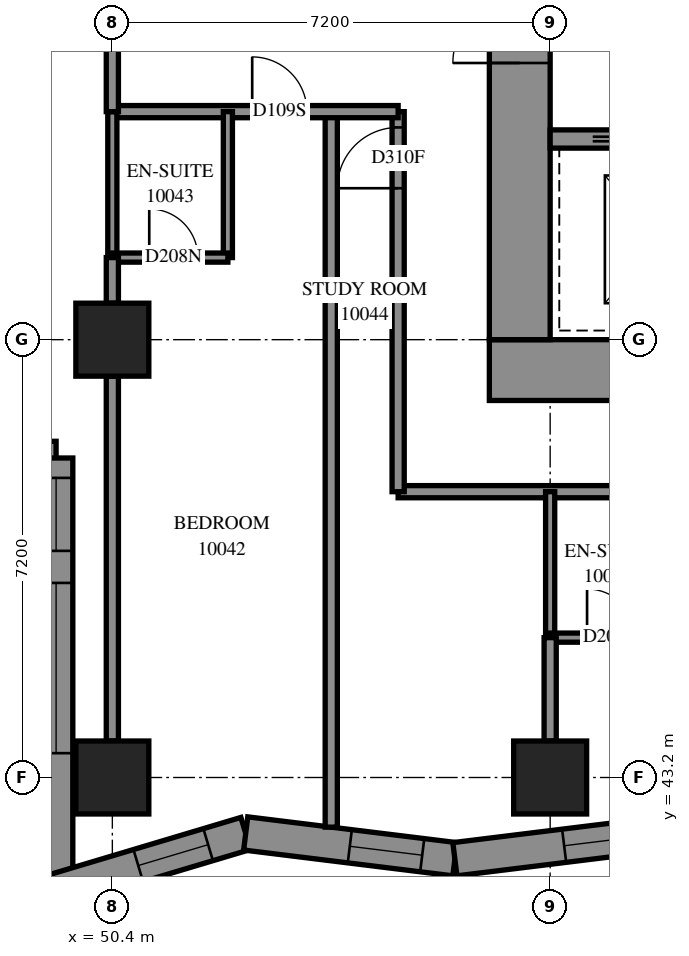
"""IFC4 building model, lengths in metres.
Left out: names, types, materials, properties, quantities, classifications, styles, units other than length and angle.
Written with IfcOpenShell. Run it as: python <this file> out.ifc"""

import sys

from ifc_helpers import new_model, si_unit, direction, frame, frame_2d, origin, origin_2d, place, context, subcontext, project, spatial, polyline, rectangle, outline, extrude, element, fill, save


model = new_model("IFC4")
c1 = context("Model", 3, precision=1e-05, world=origin(), true_north=direction((0.0, 1.0)))
c2 = subcontext(c1, "Body", "Model", "MODEL_VIEW")
j1 = project(units=[si_unit("LENGTHUNIT", "METRE"), si_unit("PLANEANGLEUNIT", "RADIAN")], contexts=[c1])
p1 = place(None, origin())
s1 = spatial("IfcSite", under=j1, at=p1, CompositionType="ELEMENT")
p2 = place(p1, origin())
s2 = spatial("IfcBuilding", under=s1, at=p2, CompositionType="ELEMENT")
p3 = place(p2, frame((0.0, 0.0, 40.6)))
s3 = spatial("IfcBuildingStorey", under=s2, at=p3, CompositionType="ELEMENT", Elevation=40.6)
for number, where, z_axis, x_axis in (
    (1, (50.4, 43.2, 0.0), (0.0, 0.0, 1.0), (1.0, 0.0, 0.0)),
    (2, (50.4, 50.4, 0.0), (0.0, 0.0, 1.0), (1.0, 0.0, 0.0)),
    (3, (57.6, 43.2, 0.0), (0.0, 0.0, 1.0), (1.0, 0.0, 0.0)),
):
    element("IfcColumn", number, at=place(p3, frame(where, z_axis=z_axis, x_axis=x_axis)), inside=s3, PredefinedType="COLUMN", context=c2, shape_type="SweptSolid", body=[
        extrude(rectangle(XDim=1.2, YDim=1.2, at=origin_2d()), origin(), (0.0, 0.0, 1.0), 3.1),
    ])
p4 = place(p3, frame((56.6, 49.9, -0.3), z_axis=(0.0, 0.0, 1.0), x_axis=(1.0, 0.0, 0.0)))
e4 = element("IfcWall", 4, at=p4, inside=s3, PredefinedType="SHEAR", context=c2, shape_type="SweptSolid", body=[
    extrude(rectangle(XDim=16.4, YDim=1.0, at=frame_2d((8.2, 0.0))), origin(), (0.0, 0.0, 1.0), 2.7),
])
p5 = place(p3, frame((57.1, 50.4, -0.3), z_axis=(0.0, 0.0, 1.0), x_axis=(0.0, 1.0, 0.0)))
e5 = element("IfcWall", 5, at=p5, inside=s3, PredefinedType="SHEAR", context=c2, shape_type="SweptSolid", body=[
    extrude(rectangle(XDim=14.4, YDim=1.0, at=frame_2d((7.2, 0.0))), origin(), (0.0, 0.0, 1.0), 2.7),
])
p6 = place(p5, frame((4.55, 0.0, 0.3)))
e6 = element("IfcOpeningElement", 6, at=p6, cuts=e5, PredefinedType="OPENING", context=c2, shape_type="SweptSolid", body=[
    extrude(rectangle(XDim=1.1, YDim=2.1, at=frame_2d((0.55, 1.05))), frame((0.0, 0.51, 0.0), z_axis=(0.0, -1.0, 0.0), x_axis=(1.0, 0.0, 0.0)), (0.0, 0.0, 1.0), 1.02),
])
p7 = place(p5, frame((11.35, 0.0, 0.3)))
e7 = element("IfcOpeningElement", 7, at=p7, cuts=e5, PredefinedType="OPENING", context=c2, shape_type="SweptSolid", body=[
    extrude(rectangle(XDim=1.1, YDim=2.1, at=frame_2d((0.55, 1.05))), frame((0.0, 0.51, 0.0), z_axis=(0.0, -1.0, 0.0), x_axis=(1.0, 0.0, 0.0)), (0.0, 0.0, 1.0), 1.02),
])
p8 = place(p3, frame((57.6, 53.7, 0.0), z_axis=(0.0, 0.0, 1.0), x_axis=(1.0, 0.0, 0.0)))
e8 = element("IfcWall", 8, at=p8, inside=s3, PredefinedType="SOLIDWALL", context=c2, shape_type="SweptSolid", body=[
    extrude(rectangle(XDim=14.4, YDim=0.3, at=frame_2d((7.2, 0.0))), origin(), (0.0, 0.0, 1.0), 3.1),
])
p9 = place(p8, frame((1.25, 0.0, 0.0)))
e9 = element("IfcOpeningElement", 9, at=p9, cuts=e8, PredefinedType="OPENING", context=c2, shape_type="SweptSolid", body=[
    extrude(rectangle(XDim=1.1, YDim=2.1, at=frame_2d((0.55, 1.05))), frame((0.0, 0.16, 0.0), z_axis=(0.0, -1.0, 0.0), x_axis=(1.0, 0.0, 0.0)), (0.0, 0.0, 1.0), 0.32),
])
p10 = place(p8, frame((4.85, 0.0, 0.0)))
e10 = element("IfcOpeningElement", 10, at=p10, cuts=e8, PredefinedType="OPENING", context=c2, shape_type="SweptSolid", body=[
    extrude(rectangle(XDim=1.1, YDim=2.1, at=frame_2d((0.55, 1.05))), frame((0.0, 0.16, 0.0), z_axis=(0.0, -1.0, 0.0), x_axis=(1.0, 0.0, 0.0)), (0.0, 0.0, 1.0), 0.32),
])
p11 = place(p8, frame((8.45, 0.0, 0.0)))
e11 = element("IfcOpeningElement", 11, at=p11, cuts=e8, PredefinedType="OPENING", context=c2, shape_type="SweptSolid", body=[
    extrude(rectangle(XDim=1.1, YDim=2.1, at=frame_2d((0.55, 1.05))), frame((0.0, 0.16, 0.0), z_axis=(0.0, -1.0, 0.0), x_axis=(1.0, 0.0, 0.0)), (0.0, 0.0, 1.0), 0.32),
])
p12 = place(p8, frame((12.05, 0.0, 0.0)))
e12 = element("IfcOpeningElement", 12, at=p12, cuts=e8, PredefinedType="OPENING", context=c2, shape_type="SweptSolid", body=[
    extrude(rectangle(XDim=1.1, YDim=2.1, at=frame_2d((0.55, 1.05))), frame((0.0, 0.16, 0.0), z_axis=(0.0, -1.0, 0.0), x_axis=(1.0, 0.0, 0.0)), (0.0, 0.0, 1.0), 0.32),
])
p13 = place(p3, frame((35.075, 48.454, 0.0), z_axis=(0.0, 0.0, 1.0), x_axis=(1.0, 0.0, 0.0)))
e13 = element("IfcWall", 13, at=p13, inside=s3, PredefinedType="SOLIDWALL", context=c2, shape_type="SweptSolid", body=[
    extrude(outline(polyline([(-0.275, -0.275), (14.125, -0.275), (14.675, 0.275), (0.275, 0.275), (-0.275, -0.275)])), origin(), (0.0, 0.0, 1.0), 3.1),
])
p14 = place(p13, frame((1.325, 0.0, 0.5)))
e14 = element("IfcOpeningElement", 14, at=p14, cuts=e13, PredefinedType="OPENING", context=c2, shape_type="SweptSolid", body=[
    extrude(rectangle(XDim=2.8, YDim=2.45, at=frame_2d((1.4, 1.225))), frame((0.0, 0.285, 0.0), z_axis=(0.0, -1.0, 0.0), x_axis=(1.0, 0.0, 0.0)), (0.0, 0.0, 1.0), 0.57),
])
p15 = place(p13, frame((4.925, 0.0, 0.5)))
e15 = element("IfcOpeningElement", 15, at=p15, cuts=e13, PredefinedType="OPENING", context=c2, shape_type="SweptSolid", body=[
    extrude(rectangle(XDim=2.8, YDim=2.45, at=frame_2d((1.4, 1.225))), frame((0.0, 0.285, 0.0), z_axis=(0.0, -1.0, 0.0), x_axis=(1.0, 0.0, 0.0)), (0.0, 0.0, 1.0), 0.57),
])
p16 = place(p13, frame((8.275, 0.0, 0.5)))
e16 = element("IfcOpeningElement", 16, at=p16, cuts=e13, PredefinedType="OPENING", context=c2, shape_type="SweptSolid", body=[
    extrude(rectangle(XDim=2.8, YDim=2.45, at=frame_2d((1.4, 1.225))), frame((0.0, 0.285, 0.0), z_axis=(0.0, -1.0, 0.0), x_axis=(1.0, 0.0, 0.0)), (0.0, 0.0, 1.0), 0.57),
])
p17 = place(p13, frame((12.363, 0.0, 0.5)))
e17 = element("IfcOpeningElement", 17, at=p17, cuts=e13, PredefinedType="OPENING", context=c2, shape_type="SweptSolid", body=[
    extrude(rectangle(XDim=1.2, YDim=2.45, at=frame_2d((0.6, 1.225))), frame((0.0, 0.285, 0.0), z_axis=(0.0, -1.0, 0.0), x_axis=(1.0, 0.0, 0.0)), (0.0, 0.0, 1.0), 0.57),
])
p18 = place(p3, frame((49.475, 48.454, 0.0), z_axis=(0.0, 0.0, 1.0), x_axis=(0.0, -1.0, 0.0)))
e18 = element("IfcWall", 18, at=p18, inside=s3, PredefinedType="SOLIDWALL", context=c2, shape_type="SweptSolid", body=[
    extrude(outline(polyline([(0.275, -0.275), (7.475, -0.275), (6.737, 0.275), (-0.275, 0.275), (0.275, -0.275)])), origin(), (0.0, 0.0, 1.0), 3.1),
])
p19 = place(p18, frame((2.054, 0.0, 0.5)))
e19 = element("IfcOpeningElement", 19, at=p19, cuts=e18, PredefinedType="OPENING", context=c2, shape_type="SweptSolid", body=[
    extrude(rectangle(XDim=2.8, YDim=2.45, at=frame_2d((1.4, 1.225))), frame((0.0, 0.285, 0.0), z_axis=(0.0, -1.0, 0.0), x_axis=(1.0, 0.0, 0.0)), (0.0, 0.0, 1.0), 0.57),
])
p20 = place(p18, frame((0.327, 0.0, 0.5)))
e20 = element("IfcOpeningElement", 20, at=p20, cuts=e18, PredefinedType="OPENING", context=c2, shape_type="SweptSolid", body=[
    extrude(rectangle(XDim=1.2, YDim=2.45, at=frame_2d((0.6, 1.225))), frame((0.0, 0.285, 0.0), z_axis=(0.0, -1.0, 0.0), x_axis=(1.0, 0.0, 0.0)), (0.0, 0.0, 1.0), 0.57),
])
p21 = place(p3, frame((49.475, 41.348, 0.0), z_axis=(0.0, 0.0, 1.0), x_axis=(0.9581327376, 0.2863243914, 0.0)))
e21 = element("IfcWall", 21, at=p21, inside=s3, PredefinedType="SOLIDWALL", context=c2, shape_type="SweptSolid", body=[
    extrude(outline(polyline([(-0.369, -0.275), (3.197, -0.275), (3.312, 0.275), (0.369, 0.275), (-0.369, -0.275)])), origin(), (0.0, 0.0, 1.0), 3.1),
])
p22 = place(p21, frame((1.41, 0.0, 0.5)))
e22 = element("IfcOpeningElement", 22, at=p22, cuts=e21, PredefinedType="OPENING", context=c2, shape_type="SweptSolid", body=[
    extrude(rectangle(XDim=1.2, YDim=2.45, at=frame_2d((0.6, 1.225))), frame((0.0, 0.285, 0.0), z_axis=(0.0, -1.0, 0.0), x_axis=(1.0, 0.0, 0.0)), (0.0, 0.0, 1.0), 0.57),
])
p23 = place(p3, frame((52.593, 42.28, 0.0), z_axis=(0.0, 0.0, 1.0), x_axis=(0.9924934036, -0.1222981756, 0.0)))
e23 = element("IfcWall", 23, at=p23, inside=s3, PredefinedType="SOLIDWALL", context=c2, shape_type="SweptSolid", body=[
    extrude(outline(polyline([(0.058, -0.275), (3.5, -0.275), (3.432, 0.275), (-0.058, 0.275), (0.058, -0.275)])), origin(), (0.0, 0.0, 1.0), 3.1),
])
p24 = place(p23, frame((1.725, 0.0, 0.5)))
e24 = element("IfcOpeningElement", 24, at=p24, cuts=e23, PredefinedType="OPENING", context=c2, shape_type="SweptSolid", body=[
    extrude(rectangle(XDim=1.2, YDim=2.45, at=frame_2d((0.6, 1.225))), frame((0.0, 0.285, 0.0), z_axis=(0.0, -1.0, 0.0), x_axis=(1.0, 0.0, 0.0)), (0.0, 0.0, 1.0), 0.57),
])
p25 = place(p3, frame((56.033, 41.856, 0.0), z_axis=(0.0, 0.0, 1.0), x_axis=(0.9924939881, 0.122293432, 0.0)))
e25 = element("IfcWall", 25, at=p25, inside=s3, PredefinedType="SOLIDWALL", context=c2, shape_type="SweptSolid", body=[
    extrude(outline(polyline([(-0.034, -0.275), (3.409, -0.275), (3.476, 0.275), (0.034, 0.275), (-0.034, -0.275)])), origin(), (0.0, 0.0, 1.0), 3.1),
])
p26 = place(p25, frame((1.81, 0.0, 0.5)))
e26 = element("IfcOpeningElement", 26, at=p26, cuts=e25, PredefinedType="OPENING", context=c2, shape_type="SweptSolid", body=[
    extrude(rectangle(XDim=1.2, YDim=2.45, at=frame_2d((0.6, 1.225))), frame((0.0, 0.285, 0.0), z_axis=(0.0, -1.0, 0.0), x_axis=(1.0, 0.0, 0.0)), (0.0, 0.0, 1.0), 0.57),
])
p27 = place(p3, frame((55.1, 47.9, 0.0), z_axis=(0.0, 0.0, 1.0), x_axis=(1.0, 0.0, 0.0)))
e27 = element("IfcWall", 27, at=p27, inside=s3, PredefinedType="PARTITIONING", context=c2, shape_type="SweptSolid", body=[
    extrude(rectangle(XDim=19.204, YDim=0.2, at=frame_2d((9.602, 0.0))), origin(), (0.0, 0.0, 1.0), 3.1),
])
p28 = place(p27, frame((6.399, 0.0, 0.0)))
e28 = element("IfcOpeningElement", 28, at=p28, cuts=e27, PredefinedType="OPENING", context=c2, shape_type="SweptSolid", body=[
    extrude(rectangle(XDim=0.9, YDim=2.1, at=frame_2d((0.45, 1.05))), frame((0.0, 0.11, 0.0), z_axis=(0.0, -1.0, 0.0), x_axis=(1.0, 0.0, 0.0)), (0.0, 0.0, 1.0), 0.22),
])
p29 = place(p27, frame((13.599, 0.0, 0.0)))
e29 = element("IfcOpeningElement", 29, at=p29, cuts=e27, PredefinedType="OPENING", context=c2, shape_type="SweptSolid", body=[
    extrude(rectangle(XDim=0.9, YDim=2.1, at=frame_2d((0.45, 1.05))), frame((0.0, 0.11, 0.0), z_axis=(0.0, -1.0, 0.0), x_axis=(1.0, 0.0, 0.0)), (0.0, 0.0, 1.0), 0.22),
])
p30 = place(p3, frame((54.0, 42.384, 0.0), z_axis=(0.0, 0.0, 1.0), x_axis=(0.0, 1.0, 0.0)))
e30 = element("IfcWall", 30, at=p30, inside=s3, PredefinedType="PARTITIONING", context=c2, shape_type="SweptSolid", body=[
    extrude(rectangle(XDim=11.766, YDim=0.2, at=frame_2d((5.883, 0.0))), origin(), (0.0, 0.0, 1.0), 3.1),
])
p31 = place(p3, frame((55.1, 47.9, 0.0), z_axis=(0.0, 0.0, 1.0), x_axis=(0.0, 1.0, 0.0)))
e31 = element("IfcWall", 31, at=p31, inside=s3, PredefinedType="PARTITIONING", context=c2, shape_type="SweptSolid", body=[
    extrude(rectangle(XDim=6.25, YDim=0.2, at=frame_2d((3.125, 0.0))), origin(), (0.0, 0.0, 1.0), 3.1),
])
p32 = place(p31, frame((4.99, 0.0, 0.0)))
e32 = element("IfcOpeningElement", 32, at=p32, cuts=e31, PredefinedType="OPENING", context=c2, shape_type="SweptSolid", body=[
    extrude(rectangle(XDim=1.0, YDim=2.1, at=frame_2d((0.5, 1.05))), frame((0.0, 0.11, 0.0), z_axis=(0.0, -1.0, 0.0), x_axis=(1.0, 0.0, 0.0)), (0.0, 0.0, 1.0), 0.22),
])
p33 = place(p3, frame((50.4, 43.8, 0.0), z_axis=(0.0, 0.0, 1.0), x_axis=(0.0, 1.0, 0.0)))
e33 = element("IfcWall", 33, at=p33, inside=s3, PredefinedType="PARTITIONING", context=c2, shape_type="SweptSolid", body=[
    extrude(rectangle(XDim=6.0, YDim=0.2, at=frame_2d((3.0, 0.0))), origin(), (0.0, 0.0, 1.0), 2.6),
])
p34 = place(p3, frame((50.4, 54.15, 0.0), z_axis=(0.0, 0.0, 1.0), x_axis=(1.0, 0.0, 0.0)))
e34 = element("IfcWall", 34, at=p34, inside=s3, PredefinedType="PARTITIONING", context=c2, shape_type="SweptSolid", body=[
    extrude(rectangle(XDim=4.7, YDim=0.2, at=frame_2d((2.35, 0.0))), origin(), (0.0, 0.0, 1.0), 3.1),
])
p35 = place(p34, frame((2.3, 0.0, 0.0)))
e35 = element("IfcOpeningElement", 35, at=p35, cuts=e34, PredefinedType="OPENING", context=c2, shape_type="SweptSolid", body=[
    extrude(rectangle(XDim=0.9, YDim=2.1, at=frame_2d((0.45, 1.05))), frame((0.0, 0.11, 0.0), z_axis=(0.0, -1.0, 0.0), x_axis=(1.0, 0.0, 0.0)), (0.0, 0.0, 1.0), 0.22),
])
for number, where, z_axis, x_axis in (
    (36, (52.3, 51.75, 0.0), (0.0, 0.0, 1.0), (0.0, 1.0, 0.0)),
    (37, (50.4, 51.75, 0.0), (0.0, 0.0, 1.0), (0.0, 1.0, 0.0)),
    (38, (57.6, 45.5, 0.0), (0.0, 0.0, 1.0), (0.0, 1.0, 0.0)),
):
    element("IfcWall", number, at=place(p3, frame(where, z_axis=z_axis, x_axis=x_axis)), inside=s3, PredefinedType="PARTITIONING", context=c2, shape_type="SweptSolid", body=[
        extrude(rectangle(XDim=2.4, YDim=0.15, at=frame_2d((1.2, 0.0))), origin(), (0.0, 0.0, 1.0), 3.1),
    ])
p36 = place(p3, frame((50.4, 54.15, 0.0), z_axis=(0.0, 0.0, 1.0), x_axis=(0.0, 1.0, 0.0)))
e39 = element("IfcWall", 39, at=p36, inside=s3, PredefinedType="PARTITIONING", context=c2, shape_type="SweptSolid", body=[
    extrude(rectangle(XDim=2.1, YDim=0.2, at=frame_2d((1.05, 0.0))), origin(), (0.0, 0.0, 1.0), 3.1),
])
p37 = place(p3, frame((50.4, 51.75, 0.0), z_axis=(0.0, 0.0, 1.0), x_axis=(1.0, 0.0, 0.0)))
e40 = element("IfcWall", 40, at=p37, inside=s3, PredefinedType="PARTITIONING", context=c2, shape_type="SweptSolid", body=[
    extrude(rectangle(XDim=1.9, YDim=0.15, at=frame_2d((0.95, 0.0))), origin(), (0.0, 0.0, 1.0), 3.1),
])
p38 = place(p37, frame((0.607, 0.0, 0.0)))
e41 = element("IfcOpeningElement", 41, at=p38, cuts=e40, PredefinedType="OPENING", context=c2, shape_type="SweptSolid", body=[
    extrude(rectangle(XDim=0.8, YDim=2.1, at=frame_2d((0.4, 1.05))), frame((0.0, 0.085, 0.0), z_axis=(0.0, -1.0, 0.0), x_axis=(1.0, 0.0, 0.0)), (0.0, 0.0, 1.0), 0.17),
])
p39 = place(p3, frame((57.6, 45.5, 0.0), z_axis=(0.0, 0.0, 1.0), x_axis=(1.0, 0.0, 0.0)))
e42 = element("IfcWall", 42, at=p39, inside=s3, PredefinedType="PARTITIONING", context=c2, shape_type="SweptSolid", body=[
    extrude(rectangle(XDim=1.9, YDim=0.15, at=frame_2d((0.95, 0.0))), origin(), (0.0, 0.0, 1.0), 3.1),
])
p40 = place(p39, frame((0.607, 0.0, 0.0)))
e43 = element("IfcOpeningElement", 43, at=p40, cuts=e42, PredefinedType="OPENING", context=c2, shape_type="SweptSolid", body=[
    extrude(rectangle(XDim=0.8, YDim=2.1, at=frame_2d((0.4, 1.05))), frame((0.0, 0.085, 0.0), z_axis=(0.0, -1.0, 0.0), x_axis=(1.0, 0.0, 0.0)), (0.0, 0.0, 1.0), 0.17),
])
p41 = place(p3, frame((57.6, 43.8, 0.0), z_axis=(0.0, 0.0, 1.0), x_axis=(0.0, 1.0, 0.0)))
e44 = element("IfcWall", 44, at=p41, inside=s3, PredefinedType="PARTITIONING", context=c2, shape_type="SweptSolid", body=[
    extrude(rectangle(XDim=1.7, YDim=0.2, at=frame_2d((0.85, 0.0))), origin(), (0.0, 0.0, 1.0), 3.1),
])
p42 = place(p3, frame((50.4, 51.0, 0.0), z_axis=(0.0, 0.0, 1.0), x_axis=(0.0, 1.0, 0.0)))
e45 = element("IfcWall", 45, at=p42, inside=s3, PredefinedType="PARTITIONING", context=c2, shape_type="SweptSolid", body=[
    extrude(rectangle(XDim=0.75, YDim=0.2, at=frame_2d((0.375, 0.0))), origin(), (0.0, 0.0, 1.0), 3.1),
])
p43 = place(p19, origin())
e46 = element("IfcWindow", 46, at=p43, inside=s3, PartitioningType="SINGLE_PANEL", PredefinedType="WINDOW", context=c2, shape_type="SweptSolid", body=[
    extrude(rectangle(XDim=2.8, YDim=2.45, at=frame_2d((1.4, 1.225))), frame((0.0, 0.155, 0.0), z_axis=(0.0, -1.0, 0.0), x_axis=(1.0, 0.0, 0.0)), (0.0, 0.0, 1.0), 0.06),
])
fill(e19, e46)
p44 = place(p20, origin())
e47 = element("IfcWindow", 47, at=p44, inside=s3, PartitioningType="SINGLE_PANEL", PredefinedType="WINDOW", context=c2, shape_type="SweptSolid", body=[
    extrude(rectangle(XDim=1.2, YDim=2.45, at=frame_2d((0.6, 1.225))), frame((0.0, 0.155, 0.0), z_axis=(0.0, -1.0, 0.0), x_axis=(1.0, 0.0, 0.0)), (0.0, 0.0, 1.0), 0.06),
])
fill(e20, e47)
p45 = place(p22, origin())
e48 = element("IfcWindow", 48, at=p45, inside=s3, PartitioningType="SINGLE_PANEL", PredefinedType="WINDOW", context=c2, shape_type="SweptSolid", body=[
    extrude(rectangle(XDim=1.2, YDim=2.45, at=frame_2d((0.6, 1.225))), frame((0.0, 0.155, 0.0), z_axis=(0.0, -1.0, 0.0), x_axis=(1.0, 0.0, 0.0)), (0.0, 0.0, 1.0), 0.06),
])
fill(e22, e48)
p46 = place(p24, origin())
e49 = element("IfcWindow", 49, at=p46, inside=s3, PartitioningType="SINGLE_PANEL", PredefinedType="WINDOW", context=c2, shape_type="SweptSolid", body=[
    extrude(rectangle(XDim=1.2, YDim=2.45, at=frame_2d((0.6, 1.225))), frame((0.0, 0.155, 0.0), z_axis=(0.0, -1.0, 0.0), x_axis=(1.0, 0.0, 0.0)), (0.0, 0.0, 1.0), 0.06),
])
fill(e24, e49)
p47 = place(p26, origin())
e50 = element("IfcWindow", 50, at=p47, inside=s3, PartitioningType="SINGLE_PANEL", PredefinedType="WINDOW", context=c2, shape_type="SweptSolid", body=[
    extrude(rectangle(XDim=1.2, YDim=2.45, at=frame_2d((0.6, 1.225))), frame((0.0, 0.155, 0.0), z_axis=(0.0, -1.0, 0.0), x_axis=(1.0, 0.0, 0.0)), (0.0, 0.0, 1.0), 0.06),
])
fill(e26, e50)
p48 = place(p6, origin())
e51 = element("IfcDoor", 51, at=p48, inside=s3, OperationType="DOUBLE_DOOR_SINGLE_SWING", PredefinedType="DOOR", context=c2, shape_type="SweptSolid", body=[
    extrude(rectangle(XDim=1.1, YDim=2.1, at=frame_2d((0.55, 1.05))), frame((0.0, 0.025, 0.0), z_axis=(0.0, -1.0, 0.0), x_axis=(1.0, 0.0, 0.0)), (0.0, 0.0, 1.0), 0.05),
])
fill(e6, e51)
p49 = place(p35, origin())
e52 = element("IfcDoor", 52, at=p49, inside=s3, OperationType="SINGLE_SWING_LEFT", PredefinedType="DOOR", context=c2, shape_type="SweptSolid", body=[
    extrude(rectangle(XDim=0.9, YDim=2.1, at=frame_2d((0.45, 1.05))), frame((0.0, 0.025, 0.0), z_axis=(0.0, -1.0, 0.0), x_axis=(1.0, 0.0, 0.0)), (0.0, 0.0, 1.0), 0.05),
])
fill(e35, e52)
p50 = place(p38, origin())
e53 = element("IfcDoor", 53, at=p50, inside=s3, OperationType="SINGLE_SWING_RIGHT", PredefinedType="DOOR", context=c2, shape_type="SweptSolid", body=[
    extrude(rectangle(XDim=0.8, YDim=2.1, at=frame_2d((0.4, 1.05))), frame((0.0, 0.025, 0.0), z_axis=(0.0, -1.0, 0.0), x_axis=(1.0, 0.0, 0.0)), (0.0, 0.0, 1.0), 0.05),
])
fill(e41, e53)
p51 = place(p32, origin())
e54 = element("IfcDoor", 54, at=p51, inside=s3, OperationType="SINGLE_SWING_RIGHT", PredefinedType="DOOR", context=c2, shape_type="SweptSolid", body=[
    extrude(rectangle(XDim=1.0, YDim=2.1, at=frame_2d((0.5, 1.05))), frame((0.0, 0.025, 0.0), z_axis=(0.0, -1.0, 0.0), x_axis=(1.0, 0.0, 0.0)), (0.0, 0.0, 1.0), 0.05),
])
fill(e32, e54)
p52 = place(p40, origin())
e55 = element("IfcDoor", 55, at=p52, inside=s3, OperationType="SINGLE_SWING_RIGHT", PredefinedType="DOOR", context=c2, shape_type="SweptSolid", body=[
    extrude(rectangle(XDim=0.8, YDim=2.1, at=frame_2d((0.4, 1.05))), frame((0.0, 0.025, 0.0), z_axis=(0.0, -1.0, 0.0), x_axis=(1.0, 0.0, 0.0)), (0.0, 0.0, 1.0), 0.05),
])
fill(e43, e55)
save(model, sys.argv[1])
